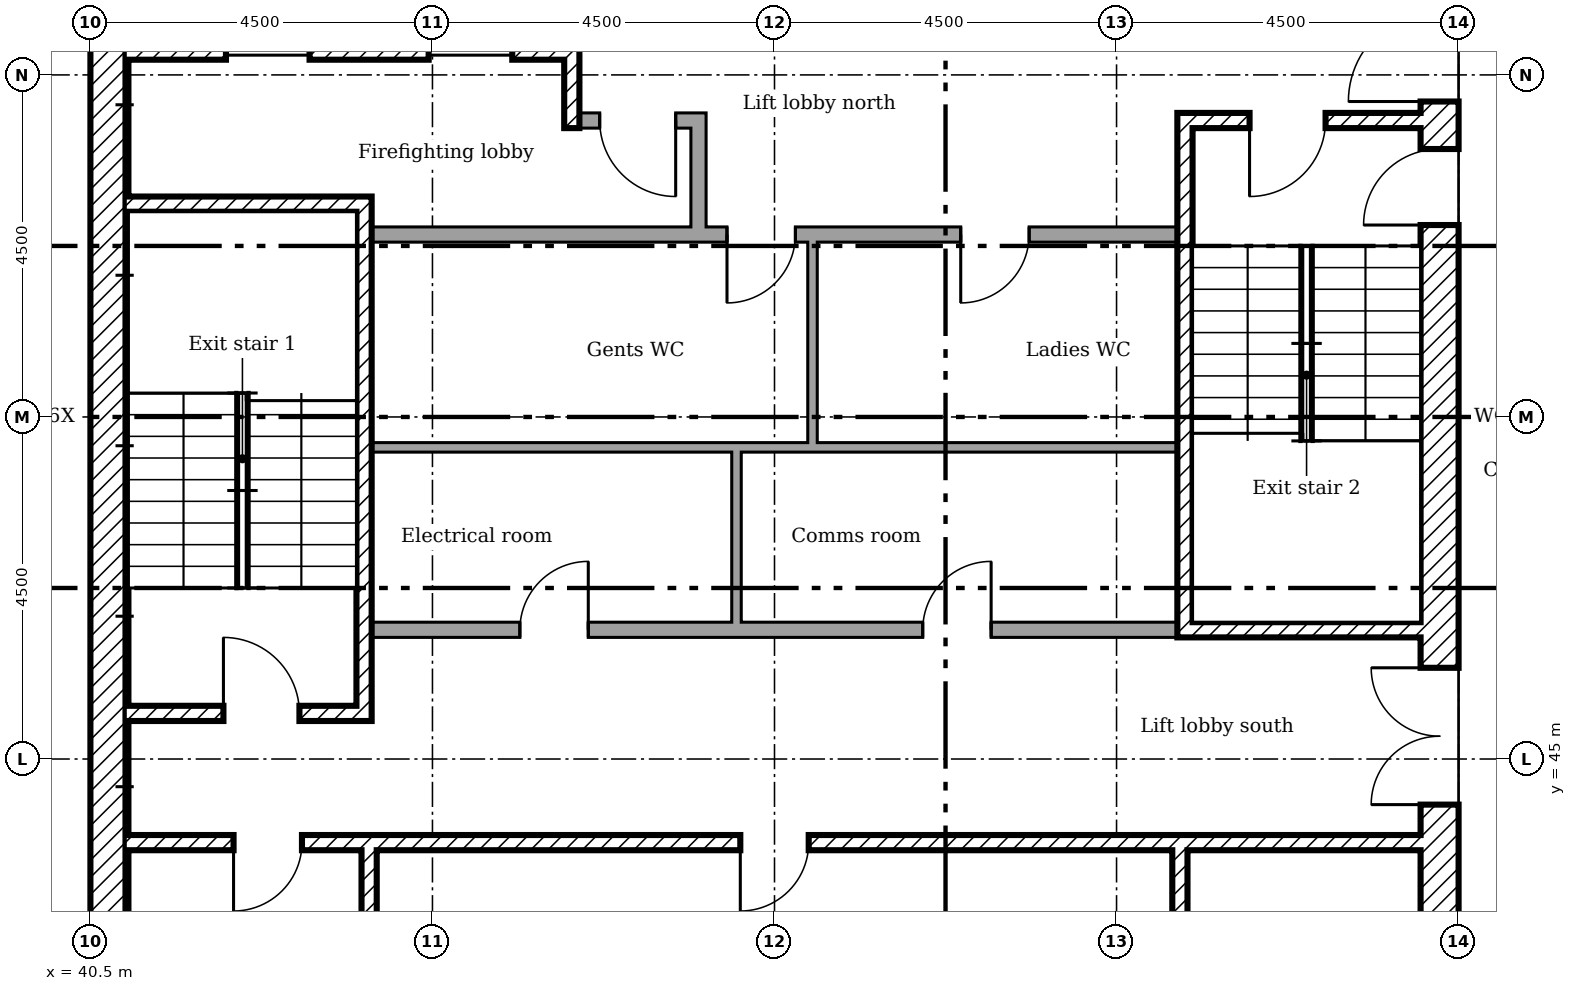
"""IFC4 building model, lengths in metres.
Left out: names, types, materials, properties, quantities, classifications, styles, units other than length and angle.
Written with IfcOpenShell. Run it as: python <this file> out.ifc"""

import sys

from ifc_helpers import new_model, si_unit, direction, frame, frame_2d, origin, place, context, subcontext, project, spatial, rectangle, extrude, element, fill, save


model = new_model("IFC4")
c1 = context("Model", 3, precision=1e-05, world=origin(), true_north=direction((0.0, 1.0)))
c2 = subcontext(c1, "Body", "Model", "MODEL_VIEW")
j1 = project(units=[si_unit("LENGTHUNIT", "METRE"), si_unit("PLANEANGLEUNIT", "RADIAN")], contexts=[c1])
p1 = place(None, origin())
s1 = spatial("IfcSite", under=j1, at=p1, CompositionType="ELEMENT")
p2 = place(p1, origin())
s2 = spatial("IfcBuilding", under=s1, at=p2, CompositionType="ELEMENT")
p3 = place(p2, frame((0.0, 0.0, 217.2)))
s3 = spatial("IfcBuildingStorey", under=s2, at=p3, CompositionType="ELEMENT", Elevation=217.2)
p4 = place(p3, frame((58.25, 40.5, 0.0), z_axis=(0.0, 0.0, 1.0), x_axis=(0.0, 1.0, 0.0)))
e1 = element("IfcWall", 1, at=p4, inside=s3, PredefinedType="SHEAR", context=c2, shape_type="SweptSolid", body=[
    extrude(rectangle(XDim=18.0, YDim=0.5, at=frame_2d((9.0, 0.0))), origin(), (0.0, 0.0, 1.0), 3.35),
])
p5 = place(p4, frame((13.15, 0.0, 0.0)))
e2 = element("IfcOpeningElement", 2, at=p5, cuts=e1, PredefinedType="OPENING", context=c2, shape_type="SweptSolid", body=[
    extrude(rectangle(XDim=1.2, YDim=2.1, at=frame_2d((0.6, 1.05))), frame((0.0, 0.26, 0.0), z_axis=(0.0, -1.0, 0.0), x_axis=(1.0, 0.0, 0.0)), (0.0, 0.0, 1.0), 0.52),
])
p6 = place(p4, frame((3.9, 0.0, 0.0)))
e3 = element("IfcOpeningElement", 3, at=p6, cuts=e1, PredefinedType="OPENING", context=c2, shape_type="SweptSolid", body=[
    extrude(rectangle(XDim=1.8, YDim=2.1, at=frame_2d((0.9, 1.05))), frame((0.0, 0.26, 0.0), z_axis=(0.0, -1.0, 0.0), x_axis=(1.0, 0.0, 0.0)), (0.0, 0.0, 1.0), 0.52),
])
p7 = place(p4, frame((11.525, 0.0, 0.0)))
e4 = element("IfcOpeningElement", 4, at=p7, cuts=e1, PredefinedType="OPENING", context=c2, shape_type="SweptSolid", body=[
    extrude(rectangle(XDim=1.0, YDim=2.1, at=frame_2d((0.5, 1.05))), frame((0.0, 0.26, 0.0), z_axis=(0.0, -1.0, 0.0), x_axis=(1.0, 0.0, 0.0)), (0.0, 0.0, 1.0), 0.52),
])
p8 = place(p3, frame((40.75, 41.0, 0.0), z_axis=(0.0, 0.0, 1.0), x_axis=(0.0, 1.0, 0.0)))
e5 = element("IfcWall", 5, at=p8, inside=s3, PredefinedType="SHEAR", context=c2, shape_type="SweptSolid", body=[
    extrude(rectangle(XDim=17.0, YDim=0.5, at=frame_2d((8.5, 0.0))), origin(), (0.0, 0.0, 1.0), 3.35),
])
p9 = place(p3, frame((46.833, 58.0, 0.0), z_axis=(0.0, 0.0, 1.0), x_axis=(0.0, -1.0, 0.0)))
e6 = element("IfcWall", 6, at=p9, inside=s3, PredefinedType="SHEAR", context=c2, shape_type="SweptSolid", body=[
    extrude(rectangle(XDim=4.7, YDim=0.2, at=frame_2d((2.35, 0.0))), origin(), (0.0, 0.0, 1.0), 3.35),
])
for number, where, z_axis, x_axis in (
    (7, (44.167, 41.0, 0.0), (0.0, 0.0, 1.0), (0.0, 1.0, 0.0)),
    (8, (54.833, 41.0, 0.0), (0.0, 0.0, 1.0), (0.0, 1.0, 0.0)),
):
    element("IfcWall", number, at=place(p3, frame(where, z_axis=z_axis, x_axis=x_axis)), inside=s3, PredefinedType="SHEAR", context=c2, shape_type="SweptSolid", body=[
        extrude(rectangle(XDim=2.8, YDim=0.2, at=frame_2d((1.4, 0.0))), origin(), (0.0, 0.0, 1.0), 3.35),
    ])
p10 = place(p3, frame((48.5, 51.9, 0.0), z_axis=(0.0, 0.0, 1.0), x_axis=(0.0, 1.0, 0.0)))
e9 = element("IfcWall", 9, at=p10, inside=s3, PredefinedType="PARTITIONING", context=c2, shape_type="SweptSolid", body=[
    extrude(rectangle(XDim=1.6, YDim=0.2, at=frame_2d((0.8, 0.0))), origin(), (0.0, 0.0, 1.0), 3.35),
])
p11 = place(p3, frame((46.933, 53.4, 0.0)))
e10 = element("IfcWall", 10, at=p11, inside=s3, PredefinedType="PARTITIONING", context=c2, shape_type="SweptSolid", body=[
    extrude(rectangle(XDim=1.467, YDim=0.2, at=frame_2d((0.733, 0.0))), origin(), (0.0, 0.0, 1.0), 3.35),
])
p12 = place(p11, frame((0.267, 0.0, 0.0)))
e11 = element("IfcOpeningElement", 11, at=p12, cuts=e10, PredefinedType="OPENING", context=c2, shape_type="SweptSolid", body=[
    extrude(rectangle(XDim=1.0, YDim=2.1, at=frame_2d((0.5, 1.05))), frame((0.0, 0.11, 0.0), z_axis=(0.0, -1.0, 0.0), x_axis=(1.0, 0.0, 0.0)), (0.0, 0.0, 1.0), 0.22),
])
p13 = place(p3, frame((41.0, 54.3, 0.0)))
e12 = element("IfcWall", 12, at=p13, inside=s3, PredefinedType="SHEAR", context=c2, shape_type="SweptSolid", body=[
    extrude(rectangle(XDim=5.733, YDim=0.2, at=frame_2d((2.867, 0.0))), origin(), (0.0, 0.0, 1.0), 3.35),
])
p14 = place(p13, frame((1.283, 0.0, 0.0)))
e13 = element("IfcOpeningElement", 13, at=p14, cuts=e12, PredefinedType="OPENING", context=c2, shape_type="SweptSolid", body=[
    extrude(rectangle(XDim=1.1, YDim=2.1, at=frame_2d((0.55, 1.05))), frame((0.0, 0.11, 0.0), z_axis=(0.0, -1.0, 0.0), x_axis=(1.0, 0.0, 0.0)), (0.0, 0.0, 1.0), 0.22),
])
p15 = place(p13, frame((3.95, 0.0, 0.0)))
e14 = element("IfcOpeningElement", 14, at=p15, cuts=e12, PredefinedType="OPENING", context=c2, shape_type="SweptSolid", body=[
    extrude(rectangle(XDim=1.1, YDim=2.1, at=frame_2d((0.55, 1.05))), frame((0.0, 0.11, 0.0), z_axis=(0.0, -1.0, 0.0), x_axis=(1.0, 0.0, 0.0)), (0.0, 0.0, 1.0), 0.22),
])
p16 = place(p3, frame((41.0, 43.9, 0.0)))
e15 = element("IfcWall", 15, at=p16, inside=s3, PredefinedType="SHEAR", context=c2, shape_type="SweptSolid", body=[
    extrude(rectangle(XDim=17.0, YDim=0.2, at=frame_2d((8.5, 0.0))), origin(), (0.0, 0.0, 1.0), 3.35),
])
p17 = place(p16, frame((1.383, 0.0, 0.0)))
e16 = element("IfcOpeningElement", 16, at=p17, cuts=e15, PredefinedType="OPENING", context=c2, shape_type="SweptSolid", body=[
    extrude(rectangle(XDim=0.9, YDim=2.1, at=frame_2d((0.45, 1.05))), frame((0.0, 0.11, 0.0), z_axis=(0.0, -1.0, 0.0), x_axis=(1.0, 0.0, 0.0)), (0.0, 0.0, 1.0), 0.22),
])
p18 = place(p16, frame((8.05, 0.0, 0.0)))
e17 = element("IfcOpeningElement", 17, at=p18, cuts=e15, PredefinedType="OPENING", context=c2, shape_type="SweptSolid", body=[
    extrude(rectangle(XDim=0.9, YDim=2.1, at=frame_2d((0.45, 1.05))), frame((0.0, 0.11, 0.0), z_axis=(0.0, -1.0, 0.0), x_axis=(1.0, 0.0, 0.0)), (0.0, 0.0, 1.0), 0.22),
])
p19 = place(p3, frame((44.1, 45.5, 0.0), z_axis=(0.0, 0.0, 1.0), x_axis=(0.0, 1.0, 0.0)))
e18 = element("IfcWall", 18, at=p19, inside=s3, PredefinedType="SHEAR", context=c2, shape_type="SweptSolid", body=[
    extrude(rectangle(XDim=6.9, YDim=0.2, at=frame_2d((3.45, 0.0))), origin(), (0.0, 0.0, 1.0), 3.35),
])
p20 = place(p3, frame((41.0, 52.3, 0.0)))
e19 = element("IfcWall", 19, at=p20, inside=s3, PredefinedType="SHEAR", context=c2, shape_type="SweptSolid", body=[
    extrude(rectangle(XDim=3.0, YDim=0.2, at=frame_2d((1.5, 0.0))), origin(), (0.0, 0.0, 1.0), 3.35),
])
p21 = place(p3, frame((41.0, 45.6, 0.0)))
e20 = element("IfcWall", 20, at=p21, inside=s3, PredefinedType="SHEAR", context=c2, shape_type="SweptSolid", body=[
    extrude(rectangle(XDim=3.0, YDim=0.2, at=frame_2d((1.5, 0.0))), origin(), (0.0, 0.0, 1.0), 3.35),
])
p22 = place(p21, frame((1.25, 0.0, 0.0)))
e21 = element("IfcOpeningElement", 21, at=p22, cuts=e20, PredefinedType="OPENING", context=c2, shape_type="SweptSolid", body=[
    extrude(rectangle(XDim=1.0, YDim=2.1, at=frame_2d((0.5, 1.05))), frame((0.0, 0.11, 0.0), z_axis=(0.0, -1.0, 0.0), x_axis=(1.0, 0.0, 0.0)), (0.0, 0.0, 1.0), 0.22),
])
p23 = place(p3, frame((54.8, 53.4, 0.0)))
e22 = element("IfcWall", 22, at=p23, inside=s3, PredefinedType="SHEAR", context=c2, shape_type="SweptSolid", body=[
    extrude(rectangle(XDim=3.2, YDim=0.2, at=frame_2d((1.6, 0.0))), origin(), (0.0, 0.0, 1.0), 3.35),
])
p24 = place(p23, frame((0.95, 0.0, 0.0)))
e23 = element("IfcOpeningElement", 23, at=p24, cuts=e22, PredefinedType="OPENING", context=c2, shape_type="SweptSolid", body=[
    extrude(rectangle(XDim=1.0, YDim=2.1, at=frame_2d((0.5, 1.05))), frame((0.0, 0.11, 0.0), z_axis=(0.0, -1.0, 0.0), x_axis=(1.0, 0.0, 0.0)), (0.0, 0.0, 1.0), 0.22),
])
p25 = place(p3, frame((54.8, 46.7, 0.0)))
e24 = element("IfcWall", 24, at=p25, inside=s3, PredefinedType="SHEAR", context=c2, shape_type="SweptSolid", body=[
    extrude(rectangle(XDim=3.2, YDim=0.2, at=frame_2d((1.6, 0.0))), origin(), (0.0, 0.0, 1.0), 3.35),
])
p26 = place(p3, frame((54.9, 46.8, 0.0), z_axis=(0.0, 0.0, 1.0), x_axis=(0.0, 1.0, 0.0)))
e25 = element("IfcWall", 25, at=p26, inside=s3, PredefinedType="SHEAR", context=c2, shape_type="SweptSolid", body=[
    extrude(rectangle(XDim=6.5, YDim=0.2, at=frame_2d((3.25, 0.0))), origin(), (0.0, 0.0, 1.0), 3.35),
])
p27 = place(p3, frame((44.2, 51.9, 0.0)))
e26 = element("IfcWall", 26, at=p27, inside=s3, PredefinedType="PARTITIONING", context=c2, shape_type="SweptSolid", body=[
    extrude(rectangle(XDim=10.6, YDim=0.2, at=frame_2d((5.3, 0.0))), origin(), (0.0, 0.0, 1.0), 3.35),
])
p28 = place(p27, frame((4.675, 0.0, 0.0)))
e27 = element("IfcOpeningElement", 27, at=p28, cuts=e26, PredefinedType="OPENING", context=c2, shape_type="SweptSolid", body=[
    extrude(rectangle(XDim=0.9, YDim=2.1, at=frame_2d((0.45, 1.05))), frame((0.0, 0.11, 0.0), z_axis=(0.0, -1.0, 0.0), x_axis=(1.0, 0.0, 0.0)), (0.0, 0.0, 1.0), 0.22),
])
p29 = place(p27, frame((7.75, 0.0, 0.0)))
e28 = element("IfcOpeningElement", 28, at=p29, cuts=e26, PredefinedType="OPENING", context=c2, shape_type="SweptSolid", body=[
    extrude(rectangle(XDim=0.9, YDim=2.1, at=frame_2d((0.45, 1.05))), frame((0.0, 0.11, 0.0), z_axis=(0.0, -1.0, 0.0), x_axis=(1.0, 0.0, 0.0)), (0.0, 0.0, 1.0), 0.22),
])
p30 = place(p3, frame((44.2, 46.7, 0.0)))
e29 = element("IfcWall", 29, at=p30, inside=s3, PredefinedType="PARTITIONING", context=c2, shape_type="SweptSolid", body=[
    extrude(rectangle(XDim=10.6, YDim=0.2, at=frame_2d((5.3, 0.0))), origin(), (0.0, 0.0, 1.0), 3.35),
])
p31 = place(p30, frame((1.95, 0.0, 0.0)))
e30 = element("IfcOpeningElement", 30, at=p31, cuts=e29, PredefinedType="OPENING", context=c2, shape_type="SweptSolid", body=[
    extrude(rectangle(XDim=0.9, YDim=2.1, at=frame_2d((0.45, 1.05))), frame((0.0, 0.11, 0.0), z_axis=(0.0, -1.0, 0.0), x_axis=(1.0, 0.0, 0.0)), (0.0, 0.0, 1.0), 0.22),
])
p32 = place(p30, frame((7.25, 0.0, 0.0)))
e31 = element("IfcOpeningElement", 31, at=p32, cuts=e29, PredefinedType="OPENING", context=c2, shape_type="SweptSolid", body=[
    extrude(rectangle(XDim=0.9, YDim=2.1, at=frame_2d((0.45, 1.05))), frame((0.0, 0.11, 0.0), z_axis=(0.0, -1.0, 0.0), x_axis=(1.0, 0.0, 0.0)), (0.0, 0.0, 1.0), 0.22),
])
p33 = place(p3, frame((49.0, 46.8, 0.0), z_axis=(0.0, 0.0, 1.0), x_axis=(0.0, 1.0, 0.0)))
e32 = element("IfcWall", 32, at=p33, inside=s3, PredefinedType="PARTITIONING", context=c2, shape_type="SweptSolid", body=[
    extrude(rectangle(XDim=2.363, YDim=0.125, at=frame_2d((1.181, 0.0))), origin(), (0.0, 0.0, 1.0), 3.35),
])
p34 = place(p3, frame((48.938, 49.1, 0.0), z_axis=(0.0, 0.0, 1.0), x_axis=(-1.0, 0.0, 0.0)))
e33 = element("IfcWall", 33, at=p34, inside=s3, PredefinedType="PARTITIONING", context=c2, shape_type="SweptSolid", body=[
    extrude(rectangle(XDim=4.738, YDim=0.125, at=frame_2d((2.369, 0.0))), origin(), (0.0, 0.0, 1.0), 3.35),
])
p35 = place(p3, frame((50.062, 49.1, 0.0), z_axis=(0.0, 0.0, 1.0), x_axis=(-1.0, 0.0, 0.0)))
e34 = element("IfcWall", 34, at=p35, inside=s3, PredefinedType="PARTITIONING", context=c2, shape_type="SweptSolid", body=[
    extrude(rectangle(XDim=1.062, YDim=0.125, at=frame_2d((0.531, 0.0))), origin(), (0.0, 0.0, 1.0), 3.35),
])
p36 = place(p3, frame((54.8, 49.1, 0.0), z_axis=(0.0, 0.0, 1.0), x_axis=(-1.0, 0.0, 0.0)))
e35 = element("IfcWall", 35, at=p36, inside=s3, PredefinedType="PARTITIONING", context=c2, shape_type="SweptSolid", body=[
    extrude(rectangle(XDim=4.8, YDim=0.125, at=frame_2d((2.4, 0.0))), origin(), (0.0, 0.0, 1.0), 3.35),
])
p37 = place(p3, frame((50.0, 49.163, 0.0), z_axis=(0.0, 0.0, 1.0), x_axis=(0.0, 1.0, 0.0)))
e36 = element("IfcWall", 36, at=p37, inside=s3, PredefinedType="PARTITIONING", context=c2, shape_type="SweptSolid", body=[
    extrude(rectangle(XDim=2.637, YDim=0.125, at=frame_2d((1.319, 0.0))), origin(), (0.0, 0.0, 1.0), 3.35),
])
p38 = place(p5, origin())
e37 = element("IfcDoor", 37, at=p38, inside=s3, OperationType="SINGLE_SWING_RIGHT", PredefinedType="DOOR", context=c2, shape_type="SweptSolid", body=[
    extrude(rectangle(XDim=1.2, YDim=2.1, at=frame_2d((0.6, 1.05))), frame((0.0, 0.025, 0.0), z_axis=(0.0, -1.0, 0.0), x_axis=(1.0, 0.0, 0.0)), (0.0, 0.0, 1.0), 0.05),
])
fill(e2, e37)
p39 = place(p6, origin())
e38 = element("IfcDoor", 38, at=p39, inside=s3, OperationType="DOUBLE_DOOR_SINGLE_SWING", PredefinedType="DOOR", context=c2, shape_type="SweptSolid", body=[
    extrude(rectangle(XDim=1.8, YDim=2.1, at=frame_2d((0.9, 1.05))), frame((0.0, 0.025, 0.0), z_axis=(0.0, -1.0, 0.0), x_axis=(1.0, 0.0, 0.0)), (0.0, 0.0, 1.0), 0.05),
])
fill(e3, e38)
p40 = place(p22, origin())
e39 = element("IfcDoor", 39, at=p40, inside=s3, OperationType="SINGLE_SWING_RIGHT", PredefinedType="DOOR", context=c2, shape_type="SweptSolid", body=[
    extrude(rectangle(XDim=1.0, YDim=2.1, at=frame_2d((0.5, 1.05))), frame((0.0, 0.025, 0.0), z_axis=(0.0, -1.0, 0.0), x_axis=(1.0, 0.0, 0.0)), (0.0, 0.0, 1.0), 0.05),
])
fill(e21, e39)
p41 = place(p24, frame((1.0, 0.0, 0.0), x_axis=(-1.0, 0.0, 0.0)))
e40 = element("IfcDoor", 40, at=p41, inside=s3, OperationType="SINGLE_SWING_LEFT", PredefinedType="DOOR", context=c2, shape_type="SweptSolid", body=[
    extrude(rectangle(XDim=1.0, YDim=2.1, at=frame_2d((0.5, 1.05))), frame((0.0, 0.025, 0.0), z_axis=(0.0, -1.0, 0.0), x_axis=(1.0, 0.0, 0.0)), (0.0, 0.0, 1.0), 0.05),
])
fill(e23, e40)
p42 = place(p7, origin())
e41 = element("IfcDoor", 41, at=p42, inside=s3, OperationType="SINGLE_SWING_RIGHT", PredefinedType="DOOR", context=c2, shape_type="SweptSolid", body=[
    extrude(rectangle(XDim=1.0, YDim=2.1, at=frame_2d((0.5, 1.05))), frame((0.0, 0.025, 0.0), z_axis=(0.0, -1.0, 0.0), x_axis=(1.0, 0.0, 0.0)), (0.0, 0.0, 1.0), 0.05),
])
fill(e4, e41)
p43 = place(p12, frame((1.0, 0.0, 0.0), x_axis=(-1.0, 0.0, 0.0)))
e42 = element("IfcDoor", 42, at=p43, inside=s3, OperationType="SINGLE_SWING_RIGHT", PredefinedType="DOOR", context=c2, shape_type="SweptSolid", body=[
    extrude(rectangle(XDim=1.0, YDim=2.1, at=frame_2d((0.5, 1.05))), frame((0.0, 0.025, 0.0), z_axis=(0.0, -1.0, 0.0), x_axis=(1.0, 0.0, 0.0)), (0.0, 0.0, 1.0), 0.05),
])
fill(e11, e42)
p44 = place(p17, frame((0.9, 0.0, 0.0), x_axis=(-1.0, 0.0, 0.0)))
e43 = element("IfcDoor", 43, at=p44, inside=s3, OperationType="SINGLE_SWING_LEFT", PredefinedType="DOOR", context=c2, shape_type="SweptSolid", body=[
    extrude(rectangle(XDim=0.9, YDim=2.1, at=frame_2d((0.45, 1.05))), frame((0.0, 0.025, 0.0), z_axis=(0.0, -1.0, 0.0), x_axis=(1.0, 0.0, 0.0)), (0.0, 0.0, 1.0), 0.05),
])
fill(e16, e43)
p45 = place(p18, frame((0.9, 0.0, 0.0), x_axis=(-1.0, 0.0, 0.0)))
e44 = element("IfcDoor", 44, at=p45, inside=s3, OperationType="SINGLE_SWING_LEFT", PredefinedType="DOOR", context=c2, shape_type="SweptSolid", body=[
    extrude(rectangle(XDim=0.9, YDim=2.1, at=frame_2d((0.45, 1.05))), frame((0.0, 0.025, 0.0), z_axis=(0.0, -1.0, 0.0), x_axis=(1.0, 0.0, 0.0)), (0.0, 0.0, 1.0), 0.05),
])
fill(e17, e44)
p46 = place(p31, origin())
e45 = element("IfcDoor", 45, at=p46, inside=s3, OperationType="SINGLE_SWING_LEFT", PredefinedType="DOOR", context=c2, shape_type="SweptSolid", body=[
    extrude(rectangle(XDim=0.9, YDim=2.1, at=frame_2d((0.45, 1.05))), frame((0.0, 0.025, 0.0), z_axis=(0.0, -1.0, 0.0), x_axis=(1.0, 0.0, 0.0)), (0.0, 0.0, 1.0), 0.05),
])
fill(e30, e45)
p47 = place(p32, origin())
e46 = element("IfcDoor", 46, at=p47, inside=s3, OperationType="SINGLE_SWING_LEFT", PredefinedType="DOOR", context=c2, shape_type="SweptSolid", body=[
    extrude(rectangle(XDim=0.9, YDim=2.1, at=frame_2d((0.45, 1.05))), frame((0.0, 0.025, 0.0), z_axis=(0.0, -1.0, 0.0), x_axis=(1.0, 0.0, 0.0)), (0.0, 0.0, 1.0), 0.05),
])
fill(e31, e46)
p48 = place(p28, frame((0.9, 0.0, 0.0), x_axis=(-1.0, 0.0, 0.0)))
e47 = element("IfcDoor", 47, at=p48, inside=s3, OperationType="SINGLE_SWING_LEFT", PredefinedType="DOOR", context=c2, shape_type="SweptSolid", body=[
    extrude(rectangle(XDim=0.9, YDim=2.1, at=frame_2d((0.45, 1.05))), frame((0.0, 0.025, 0.0), z_axis=(0.0, -1.0, 0.0), x_axis=(1.0, 0.0, 0.0)), (0.0, 0.0, 1.0), 0.05),
])
fill(e27, e47)
p49 = place(p29, frame((0.9, 0.0, 0.0), x_axis=(-1.0, 0.0, 0.0)))
e48 = element("IfcDoor", 48, at=p49, inside=s3, OperationType="SINGLE_SWING_LEFT", PredefinedType="DOOR", context=c2, shape_type="SweptSolid", body=[
    extrude(rectangle(XDim=0.9, YDim=2.1, at=frame_2d((0.45, 1.05))), frame((0.0, 0.025, 0.0), z_axis=(0.0, -1.0, 0.0), x_axis=(1.0, 0.0, 0.0)), (0.0, 0.0, 1.0), 0.05),
])
fill(e28, e48)
p50 = place(p14, origin())
e49 = element("IfcDoor", 49, at=p50, inside=s3, OperationType="SLIDING_TO_LEFT", PredefinedType="DOOR", context=c2, shape_type="SweptSolid", body=[
    extrude(rectangle(XDim=1.1, YDim=2.1, at=frame_2d((0.55, 1.05))), frame((0.0, 0.025, 0.0), z_axis=(0.0, -1.0, 0.0), x_axis=(1.0, 0.0, 0.0)), (0.0, 0.0, 1.0), 0.05),
])
fill(e13, e49)
p51 = place(p15, origin())
e50 = element("IfcDoor", 50, at=p51, inside=s3, OperationType="SLIDING_TO_LEFT", PredefinedType="DOOR", context=c2, shape_type="SweptSolid", body=[
    extrude(rectangle(XDim=1.1, YDim=2.1, at=frame_2d((0.55, 1.05))), frame((0.0, 0.025, 0.0), z_axis=(0.0, -1.0, 0.0), x_axis=(1.0, 0.0, 0.0)), (0.0, 0.0, 1.0), 0.05),
])
fill(e14, e50)
save(model, sys.argv[1])
